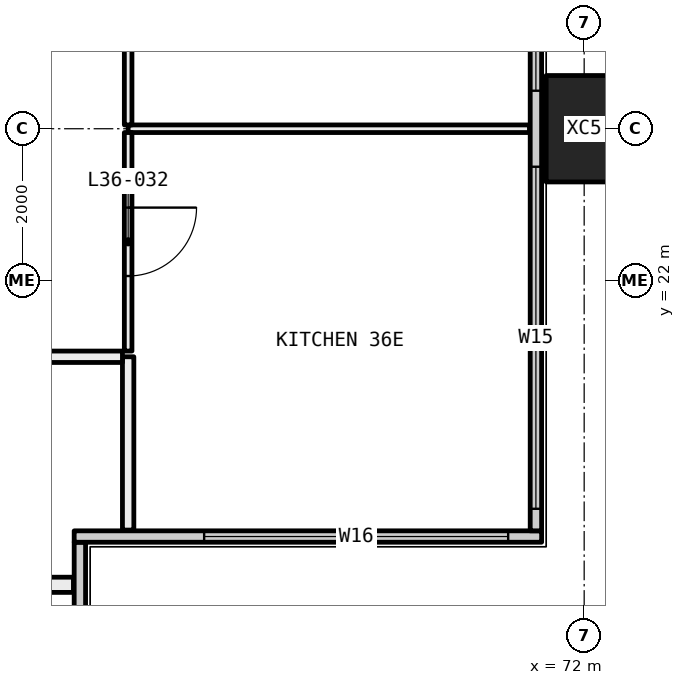
"""IFC4 building model, lengths in metres.
Left out: names, types, materials, properties, quantities, classifications, styles, units other than length and angle.
Written with IfcOpenShell. Run it as: python <this file> out.ifc"""

import sys

from ifc_helpers import new_model, si_unit, direction, frame, frame_2d, origin, origin_2d, place, context, subcontext, project, spatial, rectangle, hollow_rectangle, extrude, element, fill, save


model = new_model("IFC4")
c1 = context("Model", 3, precision=1e-05, world=origin(), true_north=direction((0.0, 1.0)))
c2 = subcontext(c1, "Body", "Model", "MODEL_VIEW")
j1 = project(units=[si_unit("LENGTHUNIT", "METRE"), si_unit("PLANEANGLEUNIT", "RADIAN")], contexts=[c1])
p1 = place(None, origin())
s1 = spatial("IfcSite", under=j1, at=p1, CompositionType="ELEMENT")
p2 = place(p1, origin())
s2 = spatial("IfcBuilding", under=s1, at=p2, CompositionType="ELEMENT")
p3 = place(p2, frame((0.0, 0.0, 138.0)))
s3 = spatial("IfcBuildingStorey", under=s2, at=p3, CompositionType="ELEMENT", Elevation=138.0)
p4 = place(p3, frame((72.0, 24.0, -0.4), z_axis=(0.0, 0.0, 1.0), x_axis=(0.0, 1.0, 0.0)))
e1 = element("IfcColumn", 1, at=p4, inside=s3, PredefinedType="COLUMN", context=c2, shape_type="SweptSolid", body=[
    extrude(hollow_rectangle(XDim=1.4, YDim=1.0, WallThickness=0.055, at=origin_2d()), origin(), (0.0, 0.0, 1.0), 3.45),
])
p5 = place(p3, frame((65.365, 12.71, 0.0), z_axis=(0.0, 0.0, 1.0), x_axis=(0.0, 1.0, 0.0)))
e2 = element("IfcWall", 2, at=p5, inside=s3, PredefinedType="ELEMENTEDWALL", context=c2, shape_type="SweptSolid", body=[
    extrude(rectangle(XDim=5.85, YDim=0.15, at=frame_2d((2.925, 0.0))), origin(), (0.0, 0.0, 1.0), 3.05),
])
p6 = place(p5, frame((0.29, 0.0, 0.45)))
e3 = element("IfcOpeningElement", 3, at=p6, cuts=e2, PredefinedType="OPENING", context=c2, shape_type="SweptSolid", body=[
    extrude(rectangle(XDim=4.0, YDim=2.55, at=frame_2d((2.0, 1.275))), frame((0.0, 0.085, 0.0), z_axis=(0.0, -1.0, 0.0), x_axis=(1.0, 0.0, 0.0)), (0.0, 0.0, 1.0), 0.17),
])
p7 = place(p3, frame((65.29, 18.635, 0.0), z_axis=(0.0, 0.0, 1.0), x_axis=(1.0, 0.0, 0.0)))
e4 = element("IfcWall", 4, at=p7, inside=s3, PredefinedType="ELEMENTEDWALL", context=c2, shape_type="SweptSolid", body=[
    extrude(rectangle(XDim=6.15, YDim=0.15, at=frame_2d((3.075, 0.0))), origin(), (0.0, 0.0, 1.0), 3.05),
])
p8 = place(p7, frame((1.71, 0.0, 0.45)))
e5 = element("IfcOpeningElement", 5, at=p8, cuts=e4, PredefinedType="OPENING", context=c2, shape_type="SweptSolid", body=[
    extrude(rectangle(XDim=4.0, YDim=2.55, at=frame_2d((2.0, 1.275))), frame((0.0, 0.085, 0.0), z_axis=(0.0, -1.0, 0.0), x_axis=(1.0, 0.0, 0.0)), (0.0, 0.0, 1.0), 0.17),
])
p9 = place(p3, frame((71.365, 18.71, 0.0), z_axis=(0.0, 0.0, 1.0), x_axis=(0.0, 1.0, 0.0)))
e6 = element("IfcWall", 6, at=p9, inside=s3, PredefinedType="ELEMENTEDWALL", context=c2, shape_type="SweptSolid", body=[
    extrude(rectangle(XDim=22.58, YDim=0.15, at=frame_2d((11.29, 0.0))), origin(), (0.0, 0.0, 1.0), 3.05),
])
p10 = place(p9, frame((0.29, 0.0, 0.45)))
e7 = element("IfcOpeningElement", 7, at=p10, cuts=e6, PredefinedType="OPENING", context=c2, shape_type="SweptSolid", body=[
    extrude(rectangle(XDim=4.5, YDim=2.55, at=frame_2d((2.25, 1.275))), frame((0.0, 0.085, 0.0), z_axis=(0.0, -1.0, 0.0), x_axis=(1.0, 0.0, 0.0)), (0.0, 0.0, 1.0), 0.17),
])
p11 = place(p9, frame((5.79, 0.0, 0.45)))
e8 = element("IfcOpeningElement", 8, at=p11, cuts=e6, PredefinedType="OPENING", context=c2, shape_type="SweptSolid", body=[
    extrude(rectangle(XDim=3.0, YDim=2.55, at=frame_2d((1.5, 1.275))), frame((0.0, 0.085, 0.0), z_axis=(0.0, -1.0, 0.0), x_axis=(1.0, 0.0, 0.0)), (0.0, 0.0, 1.0), 0.17),
])
p12 = place(p9, frame((14.79, 0.0, 0.45)))
e9 = element("IfcOpeningElement", 9, at=p12, cuts=e6, PredefinedType="OPENING", context=c2, shape_type="SweptSolid", body=[
    extrude(rectangle(XDim=2.0, YDim=2.55, at=frame_2d((1.0, 1.275))), frame((0.0, 0.085, 0.0), z_axis=(0.0, -1.0, 0.0), x_axis=(1.0, 0.0, 0.0)), (0.0, 0.0, 1.0), 0.17),
])
p13 = place(p9, frame((17.79, 0.0, 0.45)))
e10 = element("IfcOpeningElement", 10, at=p13, cuts=e6, PredefinedType="OPENING", context=c2, shape_type="SweptSolid", body=[
    extrude(rectangle(XDim=4.5, YDim=2.55, at=frame_2d((2.25, 1.275))), frame((0.0, 0.085, 0.0), z_axis=(0.0, -1.0, 0.0), x_axis=(1.0, 0.0, 0.0)), (0.0, 0.0, 1.0), 0.17),
])
p14 = place(p3, frame((65.28, 18.0, 0.0), z_axis=(0.0, 0.0, 1.0), x_axis=(-1.0, 0.0, 0.0)))
e11 = element("IfcWall", 11, at=p14, inside=s3, PredefinedType="PARTITIONING", context=c2, shape_type="SweptSolid", body=[
    extrude(rectangle(XDim=3.38, YDim=0.2, at=frame_2d((1.69, 0.0))), origin(), (0.0, 0.0, 1.0), 3.05),
])
p15 = place(p3, frame((71.28, 24.0, 0.0), z_axis=(0.0, 0.0, 1.0), x_axis=(-1.0, 0.0, 0.0)))
e12 = element("IfcWall", 12, at=p15, inside=s3, PredefinedType="PARTITIONING", context=c2, shape_type="SweptSolid", body=[
    extrude(rectangle(XDim=5.28, YDim=0.1, at=frame_2d((2.64, 0.0))), origin(), (0.0, 0.0, 1.0), 2.45),
])
p16 = place(p3, frame((66.0, 21.0, 0.0), z_axis=(0.0, 0.0, 1.0), x_axis=(0.0, -1.0, 0.0)))
e13 = element("IfcWall", 13, at=p16, inside=s3, PredefinedType="PARTITIONING", context=c2, shape_type="SweptSolid", body=[
    extrude(rectangle(XDim=2.28, YDim=0.15, at=frame_2d((1.14, 0.0))), origin(), (0.0, 0.0, 1.0), 3.05),
])
p17 = place(p3, frame((66.0, 23.95, 0.0), z_axis=(0.0, 0.0, 1.0), x_axis=(0.0, -1.0, 0.0)))
e14 = element("IfcWall", 14, at=p17, inside=s3, PredefinedType="PARTITIONING", context=c2, shape_type="SweptSolid", body=[
    extrude(rectangle(XDim=2.875, YDim=0.1, at=frame_2d((1.438, 0.0))), origin(), (0.0, 0.0, 1.0), 2.45),
])
p18 = place(p17, frame((0.988, 0.0, 0.0)))
e15 = element("IfcOpeningElement", 15, at=p18, cuts=e14, PredefinedType="OPENING", context=c2, shape_type="SweptSolid", body=[
    extrude(rectangle(XDim=0.9, YDim=2.1, at=frame_2d((0.45, 1.05))), frame((0.0, 0.06, 0.0), z_axis=(0.0, -1.0, 0.0), x_axis=(1.0, 0.0, 0.0)), (0.0, 0.0, 1.0), 0.12),
])
p19 = place(p3, frame((66.0, 29.95, 0.0), z_axis=(0.0, 0.0, 1.0), x_axis=(0.0, -1.0, 0.0)))
e16 = element("IfcWall", 16, at=p19, inside=s3, PredefinedType="PARTITIONING", context=c2, shape_type="SweptSolid", body=[
    extrude(rectangle(XDim=5.9, YDim=0.1, at=frame_2d((2.95, 0.0))), origin(), (0.0, 0.0, 1.0), 2.45),
])
p20 = place(p19, frame((2.5, 0.0, 0.0)))
e17 = element("IfcOpeningElement", 17, at=p20, cuts=e16, PredefinedType="OPENING", context=c2, shape_type="SweptSolid", body=[
    extrude(rectangle(XDim=0.9, YDim=2.1, at=frame_2d((0.45, 1.05))), frame((0.0, 0.06, 0.0), z_axis=(0.0, -1.0, 0.0), x_axis=(1.0, 0.0, 0.0)), (0.0, 0.0, 1.0), 0.12),
])
p21 = place(p3, frame((65.925, 21.0, 0.0), z_axis=(0.0, 0.0, 1.0), x_axis=(-1.0, 0.0, 0.0)))
e18 = element("IfcWall", 18, at=p21, inside=s3, PredefinedType="PARTITIONING", context=c2, shape_type="SweptSolid", body=[
    extrude(rectangle(XDim=3.925, YDim=0.15, at=frame_2d((1.962, 0.0))), origin(), (0.0, 0.0, 1.0), 3.05),
])
p22 = place(p21, frame((1.512, 0.0, 0.0)))
e19 = element("IfcOpeningElement", 19, at=p22, cuts=e18, PredefinedType="OPENING", context=c2, shape_type="SweptSolid", body=[
    extrude(rectangle(XDim=0.9, YDim=2.1, at=frame_2d((0.45, 1.05))), frame((0.0, 0.085, 0.0), z_axis=(0.0, -1.0, 0.0), x_axis=(1.0, 0.0, 0.0)), (0.0, 0.0, 1.0), 0.17),
])
p23 = place(p8, origin())
e20 = element("IfcWindow", 20, at=p23, inside=s3, PartitioningType="SINGLE_PANEL", PredefinedType="WINDOW", context=c2, shape_type="SweptSolid", body=[
    extrude(rectangle(XDim=4.0, YDim=2.55, at=frame_2d((2.0, 1.275))), frame((0.0, 0.03, 0.0), z_axis=(0.0, -1.0, 0.0), x_axis=(1.0, 0.0, 0.0)), (0.0, 0.0, 1.0), 0.06),
])
fill(e5, e20)
p24 = place(p10, origin())
e21 = element("IfcWindow", 21, at=p24, inside=s3, PartitioningType="SINGLE_PANEL", PredefinedType="WINDOW", context=c2, shape_type="SweptSolid", body=[
    extrude(rectangle(XDim=4.5, YDim=2.55, at=frame_2d((2.25, 1.275))), frame((0.0, 0.03, 0.0), z_axis=(0.0, -1.0, 0.0), x_axis=(1.0, 0.0, 0.0)), (0.0, 0.0, 1.0), 0.06),
])
fill(e7, e21)
p25 = place(p11, origin())
e22 = element("IfcWindow", 22, at=p25, inside=s3, PartitioningType="SINGLE_PANEL", PredefinedType="WINDOW", context=c2, shape_type="SweptSolid", body=[
    extrude(rectangle(XDim=3.0, YDim=2.55, at=frame_2d((1.5, 1.275))), frame((0.0, 0.03, 0.0), z_axis=(0.0, -1.0, 0.0), x_axis=(1.0, 0.0, 0.0)), (0.0, 0.0, 1.0), 0.06),
])
fill(e8, e22)
p26 = place(p18, origin())
e23 = element("IfcDoor", 23, at=p26, inside=s3, OperationType="SINGLE_SWING_RIGHT", PredefinedType="DOOR", context=c2, shape_type="SweptSolid", body=[
    extrude(rectangle(XDim=0.9, YDim=2.1, at=frame_2d((0.45, 1.05))), frame((0.0, 0.025, 0.0), z_axis=(0.0, -1.0, 0.0), x_axis=(1.0, 0.0, 0.0)), (0.0, 0.0, 1.0), 0.05),
])
fill(e15, e23)
save(model, sys.argv[1])
